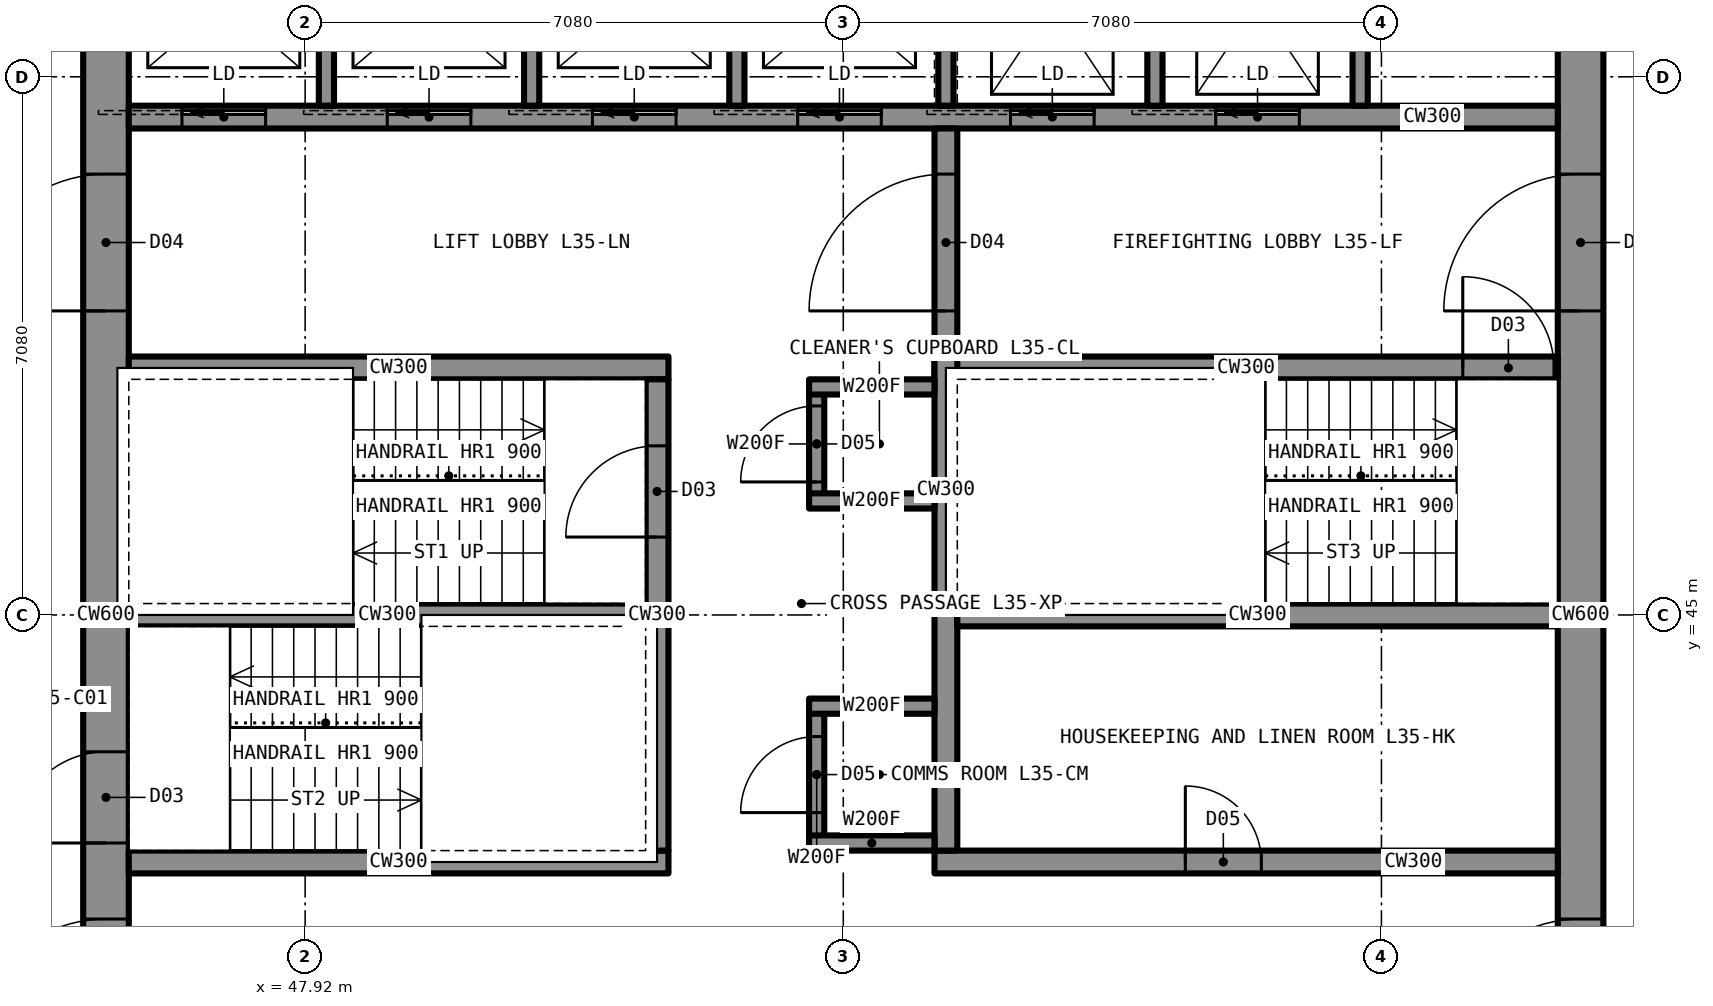
"""IFC4 building model, lengths in metres.
Left out: names, types, materials, properties, quantities, classifications, styles, units other than length and angle.
Written with IfcOpenShell. Run it as: python <this file> out.ifc"""

import sys

from ifc_helpers import new_model, si_unit, direction, frame, frame_2d, origin, place, context, subcontext, project, spatial, rectangle, extrude, element, fill, save


model = new_model("IFC4")
c1 = context("Model", 3, precision=1e-05, world=origin(), true_north=direction((0.0, 1.0)))
c2 = subcontext(c1, "Body", "Model", "MODEL_VIEW")
j1 = project(units=[si_unit("LENGTHUNIT", "METRE"), si_unit("PLANEANGLEUNIT", "RADIAN")], contexts=[c1])
p1 = place(None, origin())
s1 = spatial("IfcSite", under=j1, at=p1, CompositionType="ELEMENT")
p2 = place(p1, origin())
s2 = spatial("IfcBuilding", under=s1, at=p2, CompositionType="ELEMENT")
p3 = place(p2, frame((0.0, 0.0, 124.9)))
s3 = spatial("IfcBuildingStorey", under=s2, at=p3, CompositionType="ELEMENT", Elevation=124.9)
p4 = place(p3, frame((64.7, 35.6, 0.0), z_axis=(0.0, 0.0, 1.0), x_axis=(0.0, 1.0, 0.0)))
e1 = element("IfcWall", 1, at=p4, inside=s3, PredefinedType="SHEAR", context=c2, shape_type="SweptSolid", body=[
    extrude(rectangle(XDim=18.8, YDim=0.6, at=frame_2d((9.4, 0.0))), origin(), (0.0, 0.0, 1.0), 3.5),
])
p5 = place(p4, frame((13.4, 0.0, 0.0)))
e2 = element("IfcOpeningElement", 2, at=p5, cuts=e1, PredefinedType="OPENING", context=c2, shape_type="SweptSolid", body=[
    extrude(rectangle(XDim=1.8, YDim=2.2, at=frame_2d((0.9, 1.1))), frame((0.0, 0.31, 0.0), z_axis=(0.0, -1.0, 0.0), x_axis=(1.0, 0.0, 0.0)), (0.0, 0.0, 1.0), 0.62),
])
p6 = place(p4, frame((3.6, 0.0, 0.0)))
e3 = element("IfcOpeningElement", 3, at=p6, cuts=e1, PredefinedType="OPENING", context=c2, shape_type="SweptSolid", body=[
    extrude(rectangle(XDim=1.8, YDim=2.2, at=frame_2d((0.9, 1.1))), frame((0.0, 0.31, 0.0), z_axis=(0.0, -1.0, 0.0), x_axis=(1.0, 0.0, 0.0)), (0.0, 0.0, 1.0), 0.62),
])
p7 = place(p3, frame((45.3, 35.6, 0.0), z_axis=(0.0, 0.0, 1.0), x_axis=(0.0, 1.0, 0.0)))
e4 = element("IfcWall", 4, at=p7, inside=s3, PredefinedType="SHEAR", context=c2, shape_type="SweptSolid", body=[
    extrude(rectangle(XDim=18.8, YDim=0.6, at=frame_2d((9.4, 0.0))), origin(), (0.0, 0.0, 1.0), 3.5),
])
p8 = place(p7, frame((13.4, 0.0, 0.0)))
e5 = element("IfcOpeningElement", 5, at=p8, cuts=e4, PredefinedType="OPENING", context=c2, shape_type="SweptSolid", body=[
    extrude(rectangle(XDim=1.8, YDim=2.2, at=frame_2d((0.9, 1.1))), frame((0.0, 0.31, 0.0), z_axis=(0.0, -1.0, 0.0), x_axis=(1.0, 0.0, 0.0)), (0.0, 0.0, 1.0), 0.62),
])
p9 = place(p7, frame((3.6, 0.0, 0.0)))
e6 = element("IfcOpeningElement", 6, at=p9, cuts=e4, PredefinedType="OPENING", context=c2, shape_type="SweptSolid", body=[
    extrude(rectangle(XDim=1.8, YDim=2.2, at=frame_2d((0.9, 1.1))), frame((0.0, 0.31, 0.0), z_axis=(0.0, -1.0, 0.0), x_axis=(1.0, 0.0, 0.0)), (0.0, 0.0, 1.0), 0.62),
])
p10 = place(p7, frame((6.4, 0.0, 0.0)))
e7 = element("IfcOpeningElement", 7, at=p10, cuts=e4, PredefinedType="OPENING", context=c2, shape_type="SweptSolid", body=[
    extrude(rectangle(XDim=1.2, YDim=2.2, at=frame_2d((0.6, 1.1))), frame((0.0, 0.31, 0.0), z_axis=(0.0, -1.0, 0.0), x_axis=(1.0, 0.0, 0.0)), (0.0, 0.0, 1.0), 0.62),
])
p11 = place(p3, frame((45.6, 51.55, 0.0), z_axis=(0.0, 0.0, 1.0), x_axis=(1.0, 0.0, 0.0)))
e8 = element("IfcWall", 8, at=p11, inside=s3, PredefinedType="SHEAR", context=c2, shape_type="SweptSolid", body=[
    extrude(rectangle(XDim=18.8, YDim=0.3, at=frame_2d((9.4, 0.0))), origin(), (0.0, 0.0, 1.0), 3.5),
])
p12 = place(p11, frame((0.7, 0.0, 0.0)))
e9 = element("IfcOpeningElement", 9, at=p12, cuts=e8, PredefinedType="OPENING", context=c2, shape_type="SweptSolid", body=[
    extrude(rectangle(XDim=1.1, YDim=2.2, at=frame_2d((0.55, 1.1))), frame((0.0, 0.16, 0.0), z_axis=(0.0, -1.0, 0.0), x_axis=(1.0, 0.0, 0.0)), (0.0, 0.0, 1.0), 0.32),
])
p13 = place(p11, frame((3.4, 0.0, 0.0)))
e10 = element("IfcOpeningElement", 10, at=p13, cuts=e8, PredefinedType="OPENING", context=c2, shape_type="SweptSolid", body=[
    extrude(rectangle(XDim=1.1, YDim=2.2, at=frame_2d((0.55, 1.1))), frame((0.0, 0.16, 0.0), z_axis=(0.0, -1.0, 0.0), x_axis=(1.0, 0.0, 0.0)), (0.0, 0.0, 1.0), 0.32),
])
p14 = place(p11, frame((6.1, 0.0, 0.0)))
e11 = element("IfcOpeningElement", 11, at=p14, cuts=e8, PredefinedType="OPENING", context=c2, shape_type="SweptSolid", body=[
    extrude(rectangle(XDim=1.1, YDim=2.2, at=frame_2d((0.55, 1.1))), frame((0.0, 0.16, 0.0), z_axis=(0.0, -1.0, 0.0), x_axis=(1.0, 0.0, 0.0)), (0.0, 0.0, 1.0), 0.32),
])
p15 = place(p11, frame((8.8, 0.0, 0.0)))
e12 = element("IfcOpeningElement", 12, at=p15, cuts=e8, PredefinedType="OPENING", context=c2, shape_type="SweptSolid", body=[
    extrude(rectangle(XDim=1.1, YDim=2.2, at=frame_2d((0.55, 1.1))), frame((0.0, 0.16, 0.0), z_axis=(0.0, -1.0, 0.0), x_axis=(1.0, 0.0, 0.0)), (0.0, 0.0, 1.0), 0.32),
])
p16 = place(p11, frame((11.6, 0.0, 0.0)))
e13 = element("IfcOpeningElement", 13, at=p16, cuts=e8, PredefinedType="OPENING", context=c2, shape_type="SweptSolid", body=[
    extrude(rectangle(XDim=1.1, YDim=2.2, at=frame_2d((0.55, 1.1))), frame((0.0, 0.16, 0.0), z_axis=(0.0, -1.0, 0.0), x_axis=(1.0, 0.0, 0.0)), (0.0, 0.0, 1.0), 0.32),
])
p17 = place(p11, frame((14.3, 0.0, 0.0)))
e14 = element("IfcOpeningElement", 14, at=p17, cuts=e8, PredefinedType="OPENING", context=c2, shape_type="SweptSolid", body=[
    extrude(rectangle(XDim=1.1, YDim=2.2, at=frame_2d((0.55, 1.1))), frame((0.0, 0.16, 0.0), z_axis=(0.0, -1.0, 0.0), x_axis=(1.0, 0.0, 0.0)), (0.0, 0.0, 1.0), 0.32),
])
p18 = place(p3, frame((45.6, 48.25, 0.0), z_axis=(0.0, 0.0, 1.0), x_axis=(1.0, 0.0, 0.0)))
e15 = element("IfcWall", 15, at=p18, inside=s3, PredefinedType="SHEAR", context=c2, shape_type="SweptSolid", body=[
    extrude(rectangle(XDim=7.1, YDim=0.3, at=frame_2d((3.55, 0.0))), origin(), (0.0, 0.0, 1.0), 3.5),
])
p19 = place(p3, frame((56.2, 48.25, 0.0), z_axis=(0.0, 0.0, 1.0), x_axis=(1.0, 0.0, 0.0)))
e16 = element("IfcWall", 16, at=p19, inside=s3, PredefinedType="SHEAR", context=c2, shape_type="SweptSolid", body=[
    extrude(rectangle(XDim=8.2, YDim=0.3, at=frame_2d((4.1, 0.0))), origin(), (0.0, 0.0, 1.0), 3.5),
])
p20 = place(p19, frame((6.95, 0.0, 0.0)))
e17 = element("IfcOpeningElement", 17, at=p20, cuts=e16, PredefinedType="OPENING", context=c2, shape_type="SweptSolid", body=[
    extrude(rectangle(XDim=1.2, YDim=2.2, at=frame_2d((0.6, 1.1))), frame((0.0, 0.16, 0.0), z_axis=(0.0, -1.0, 0.0), x_axis=(1.0, 0.0, 0.0)), (0.0, 0.0, 1.0), 0.32),
])
p21 = place(p3, frame((45.6, 41.75, 0.0), z_axis=(0.0, 0.0, 1.0), x_axis=(1.0, 0.0, 0.0)))
e18 = element("IfcWall", 18, at=p21, inside=s3, PredefinedType="SHEAR", context=c2, shape_type="SweptSolid", body=[
    extrude(rectangle(XDim=7.1, YDim=0.3, at=frame_2d((3.55, 0.0))), origin(), (0.0, 0.0, 1.0), 3.5),
])
p22 = place(p3, frame((56.2, 41.75, 0.0), z_axis=(0.0, 0.0, 1.0), x_axis=(1.0, 0.0, 0.0)))
e19 = element("IfcWall", 19, at=p22, inside=s3, PredefinedType="SHEAR", context=c2, shape_type="SweptSolid", body=[
    extrude(rectangle(XDim=8.2, YDim=0.3, at=frame_2d((4.1, 0.0))), origin(), (0.0, 0.0, 1.0), 3.5),
])
p23 = place(p22, frame((3.3, 0.0, 0.0)))
e20 = element("IfcOpeningElement", 20, at=p23, cuts=e19, PredefinedType="OPENING", context=c2, shape_type="SweptSolid", body=[
    extrude(rectangle(XDim=1.0, YDim=2.1, at=frame_2d((0.5, 1.05))), frame((0.0, 0.16, 0.0), z_axis=(0.0, -1.0, 0.0), x_axis=(1.0, 0.0, 0.0)), (0.0, 0.0, 1.0), 0.32),
])
p24 = place(p3, frame((52.55, 41.9, 0.0), z_axis=(0.0, 0.0, 1.0), x_axis=(0.0, 1.0, 0.0)))
e21 = element("IfcWall", 21, at=p24, inside=s3, PredefinedType="SHEAR", context=c2, shape_type="SweptSolid", body=[
    extrude(rectangle(XDim=6.2, YDim=0.3, at=frame_2d((3.1, 0.0))), origin(), (0.0, 0.0, 1.0), 3.5),
])
p25 = place(p24, frame((4.125, 0.0, 0.0)))
e22 = element("IfcOpeningElement", 22, at=p25, cuts=e21, PredefinedType="OPENING", context=c2, shape_type="SweptSolid", body=[
    extrude(rectangle(XDim=1.2, YDim=2.2, at=frame_2d((0.6, 1.1))), frame((0.0, 0.16, 0.0), z_axis=(0.0, -1.0, 0.0), x_axis=(1.0, 0.0, 0.0)), (0.0, 0.0, 1.0), 0.32),
])
p26 = place(p3, frame((56.35, 41.9, 0.0), z_axis=(0.0, 0.0, 1.0), x_axis=(0.0, 1.0, 0.0)))
e23 = element("IfcWall", 23, at=p26, inside=s3, PredefinedType="SHEAR", context=c2, shape_type="SweptSolid", body=[
    extrude(rectangle(XDim=9.5, YDim=0.3, at=frame_2d((4.75, 0.0))), origin(), (0.0, 0.0, 1.0), 3.5),
])
p27 = place(p26, frame((7.1, 0.0, 0.0)))
e24 = element("IfcOpeningElement", 24, at=p27, cuts=e23, PredefinedType="OPENING", context=c2, shape_type="SweptSolid", body=[
    extrude(rectangle(XDim=1.8, YDim=2.2, at=frame_2d((0.9, 1.1))), frame((0.0, 0.16, 0.0), z_axis=(0.0, -1.0, 0.0), x_axis=(1.0, 0.0, 0.0)), (0.0, 0.0, 1.0), 0.32),
])
p28 = place(p3, frame((45.6, 45.0, 0.0), z_axis=(0.0, 0.0, 1.0), x_axis=(1.0, 0.0, 0.0)))
e25 = element("IfcWall", 25, at=p28, inside=s3, PredefinedType="SHEAR", context=c2, shape_type="SweptSolid", body=[
    extrude(rectangle(XDim=6.8, YDim=0.3, at=frame_2d((3.4, 0.0))), origin(), (0.0, 0.0, 1.0), 3.5),
])
p29 = place(p3, frame((56.5, 45.0, 0.0), z_axis=(0.0, 0.0, 1.0), x_axis=(1.0, 0.0, 0.0)))
e26 = element("IfcWall", 26, at=p29, inside=s3, PredefinedType="SHEAR", context=c2, shape_type="SweptSolid", body=[
    extrude(rectangle(XDim=7.9, YDim=0.3, at=frame_2d((3.95, 0.0))), origin(), (0.0, 0.0, 1.0), 3.5),
])
p30 = place(p3, frame((54.35, 42.0, 0.0), z_axis=(0.0, 0.0, 1.0), x_axis=(0.0, 1.0, 0.0)))
e27 = element("IfcWall", 27, at=p30, inside=s3, PredefinedType="PARTITIONING", context=c2, shape_type="SweptSolid", body=[
    extrude(rectangle(XDim=2.5, YDim=0.2, at=frame_2d((1.25, 0.0))), origin(), (0.0, 0.0, 1.0), 3.33),
])
p31 = place(p30, frame((0.75, 0.0, 0.0)))
e28 = element("IfcOpeningElement", 28, at=p31, cuts=e27, PredefinedType="OPENING", context=c2, shape_type="SweptSolid", body=[
    extrude(rectangle(XDim=1.0, YDim=2.1, at=frame_2d((0.5, 1.05))), frame((0.0, 0.11, 0.0), z_axis=(0.0, -1.0, 0.0), x_axis=(1.0, 0.0, 0.0)), (0.0, 0.0, 1.0), 0.22),
])
for number, where, z_axis, x_axis in (
    (29, (54.25, 42.0, 0.0), (0.0, 0.0, 1.0), (1.0, 0.0, 0.0)),
    (30, (54.25, 44.5, 0.0), (0.0, 0.0, 1.0), (1.0, 0.0, 0.0)),
):
    element("IfcWall", number, at=place(p3, frame(where, z_axis=z_axis, x_axis=x_axis)), inside=s3, PredefinedType="PARTITIONING", context=c2, shape_type="SweptSolid", body=[
        extrude(rectangle(XDim=1.95, YDim=0.2, at=frame_2d((0.975, 0.0))), origin(), (0.0, 0.0, 1.0), 3.33),
    ])
p32 = place(p3, frame((54.35, 44.9, 0.0), z_axis=(0.0, 0.0, 1.0), x_axis=(0.0, 1.0, 0.0)))
e31 = element("IfcWall", 31, at=p32, inside=s3, PredefinedType="PARTITIONING", context=c2, shape_type="SweptSolid", body=[
    extrude(rectangle(XDim=1.7, YDim=0.2, at=frame_2d((0.85, 0.0))), origin(), (0.0, 0.0, 1.0), 3.33),
])
p33 = place(p32, frame((0.35, 0.0, 0.0)))
e32 = element("IfcOpeningElement", 32, at=p33, cuts=e31, PredefinedType="OPENING", context=c2, shape_type="SweptSolid", body=[
    extrude(rectangle(XDim=1.0, YDim=2.1, at=frame_2d((0.5, 1.05))), frame((0.0, 0.11, 0.0), z_axis=(0.0, -1.0, 0.0), x_axis=(1.0, 0.0, 0.0)), (0.0, 0.0, 1.0), 0.22),
])
for number, where, z_axis, x_axis in (
    (33, (54.25, 44.9, 0.0), (0.0, 0.0, 1.0), (1.0, 0.0, 0.0)),
    (34, (54.25, 46.6, 0.0), (0.0, 0.0, 1.0), (1.0, 0.0, 0.0)),
):
    element("IfcWall", number, at=place(p3, frame(where, z_axis=z_axis, x_axis=x_axis)), inside=s3, PredefinedType="PARTITIONING", context=c2, shape_type="SweptSolid", body=[
        extrude(rectangle(XDim=1.95, YDim=0.2, at=frame_2d((0.975, 0.0))), origin(), (0.0, 0.0, 1.0), 3.33),
    ])
for number, where, z_axis, x_axis in (
    (35, (48.2, 51.7, 0.0), (0.0, 0.0, 1.0), (0.0, 1.0, 0.0)),
    (36, (50.9, 51.7, 0.0), (0.0, 0.0, 1.0), (0.0, 1.0, 0.0)),
    (37, (53.6, 51.7, 0.0), (0.0, 0.0, 1.0), (0.0, 1.0, 0.0)),
    (38, (59.1, 51.7, 0.0), (0.0, 0.0, 1.0), (0.0, 1.0, 0.0)),
    (39, (61.8, 51.7, 0.0), (0.0, 0.0, 1.0), (0.0, 1.0, 0.0)),
    (40, (56.35, 51.7, 0.0), (0.0, 0.0, 1.0), (0.0, 1.0, 0.0)),
):
    element("IfcWall", number, at=place(p3, frame(where, z_axis=z_axis, x_axis=x_axis)), inside=s3, PredefinedType="PARTITIONING", context=c2, shape_type="SweptSolid", body=[
        extrude(rectangle(XDim=2.7, YDim=0.2, at=frame_2d((1.35, 0.0))), origin(), (0.0, 0.0, 1.0), 3.33),
    ])
p34 = place(p31, origin())
e41 = element("IfcDoor", 41, at=p34, inside=s3, OperationType="SINGLE_SWING_LEFT", PredefinedType="DOOR", context=c2, shape_type="SweptSolid", body=[
    extrude(rectangle(XDim=1.0, YDim=2.1, at=frame_2d((0.5, 1.05))), frame((0.0, 0.025, 0.0), z_axis=(0.0, -1.0, 0.0), x_axis=(1.0, 0.0, 0.0)), (0.0, 0.0, 1.0), 0.05),
])
fill(e28, e41)
p35 = place(p33, origin())
e42 = element("IfcDoor", 42, at=p35, inside=s3, OperationType="SINGLE_SWING_LEFT", PredefinedType="DOOR", context=c2, shape_type="SweptSolid", body=[
    extrude(rectangle(XDim=1.0, YDim=2.1, at=frame_2d((0.5, 1.05))), frame((0.0, 0.025, 0.0), z_axis=(0.0, -1.0, 0.0), x_axis=(1.0, 0.0, 0.0)), (0.0, 0.0, 1.0), 0.05),
])
fill(e32, e42)
p36 = place(p8, origin())
e43 = element("IfcDoor", 43, at=p36, inside=s3, OperationType="DOUBLE_DOOR_SINGLE_SWING", PredefinedType="DOOR", context=c2, shape_type="SweptSolid", body=[
    extrude(rectangle(XDim=1.8, YDim=2.2, at=frame_2d((0.9, 1.1))), frame((0.0, 0.025, 0.0), z_axis=(0.0, -1.0, 0.0), x_axis=(1.0, 0.0, 0.0)), (0.0, 0.0, 1.0), 0.05),
])
fill(e5, e43)
p37 = place(p9, origin())
e44 = element("IfcDoor", 44, at=p37, inside=s3, OperationType="DOUBLE_DOOR_SINGLE_SWING", PredefinedType="DOOR", context=c2, shape_type="SweptSolid", body=[
    extrude(rectangle(XDim=1.8, YDim=2.2, at=frame_2d((0.9, 1.1))), frame((0.0, 0.025, 0.0), z_axis=(0.0, -1.0, 0.0), x_axis=(1.0, 0.0, 0.0)), (0.0, 0.0, 1.0), 0.05),
])
fill(e6, e44)
p38 = place(p5, origin())
e45 = element("IfcDoor", 45, at=p38, inside=s3, OperationType="DOUBLE_DOOR_SINGLE_SWING", PredefinedType="DOOR", context=c2, shape_type="SweptSolid", body=[
    extrude(rectangle(XDim=1.8, YDim=2.2, at=frame_2d((0.9, 1.1))), frame((0.0, 0.025, 0.0), z_axis=(0.0, -1.0, 0.0), x_axis=(1.0, 0.0, 0.0)), (0.0, 0.0, 1.0), 0.05),
])
fill(e2, e45)
p39 = place(p6, origin())
e46 = element("IfcDoor", 46, at=p39, inside=s3, OperationType="DOUBLE_DOOR_SINGLE_SWING", PredefinedType="DOOR", context=c2, shape_type="SweptSolid", body=[
    extrude(rectangle(XDim=1.8, YDim=2.2, at=frame_2d((0.9, 1.1))), frame((0.0, 0.025, 0.0), z_axis=(0.0, -1.0, 0.0), x_axis=(1.0, 0.0, 0.0)), (0.0, 0.0, 1.0), 0.05),
])
fill(e3, e46)
p40 = place(p27, origin())
e47 = element("IfcDoor", 47, at=p40, inside=s3, OperationType="DOUBLE_DOOR_SINGLE_SWING", PredefinedType="DOOR", context=c2, shape_type="SweptSolid", body=[
    extrude(rectangle(XDim=1.8, YDim=2.2, at=frame_2d((0.9, 1.1))), frame((0.0, 0.025, 0.0), z_axis=(0.0, -1.0, 0.0), x_axis=(1.0, 0.0, 0.0)), (0.0, 0.0, 1.0), 0.05),
])
fill(e24, e47)
p41 = place(p25, origin())
e48 = element("IfcDoor", 48, at=p41, inside=s3, OperationType="SINGLE_SWING_LEFT", PredefinedType="DOOR", context=c2, shape_type="SweptSolid", body=[
    extrude(rectangle(XDim=1.2, YDim=2.2, at=frame_2d((0.6, 1.1))), frame((0.0, 0.025, 0.0), z_axis=(0.0, -1.0, 0.0), x_axis=(1.0, 0.0, 0.0)), (0.0, 0.0, 1.0), 0.05),
])
fill(e22, e48)
p42 = place(p10, origin())
e49 = element("IfcDoor", 49, at=p42, inside=s3, OperationType="SINGLE_SWING_LEFT", PredefinedType="DOOR", context=c2, shape_type="SweptSolid", body=[
    extrude(rectangle(XDim=1.2, YDim=2.2, at=frame_2d((0.6, 1.1))), frame((0.0, 0.025, 0.0), z_axis=(0.0, -1.0, 0.0), x_axis=(1.0, 0.0, 0.0)), (0.0, 0.0, 1.0), 0.05),
])
fill(e7, e49)
p43 = place(p20, origin())
e50 = element("IfcDoor", 50, at=p43, inside=s3, OperationType="SINGLE_SWING_LEFT", PredefinedType="DOOR", context=c2, shape_type="SweptSolid", body=[
    extrude(rectangle(XDim=1.2, YDim=2.2, at=frame_2d((0.6, 1.1))), frame((0.0, 0.025, 0.0), z_axis=(0.0, -1.0, 0.0), x_axis=(1.0, 0.0, 0.0)), (0.0, 0.0, 1.0), 0.05),
])
fill(e17, e50)
p44 = place(p23, origin())
e51 = element("IfcDoor", 51, at=p44, inside=s3, OperationType="SINGLE_SWING_LEFT", PredefinedType="DOOR", context=c2, shape_type="SweptSolid", body=[
    extrude(rectangle(XDim=1.0, YDim=2.1, at=frame_2d((0.5, 1.05))), frame((0.0, 0.025, 0.0), z_axis=(0.0, -1.0, 0.0), x_axis=(1.0, 0.0, 0.0)), (0.0, 0.0, 1.0), 0.05),
])
fill(e20, e51)
p45 = place(p12, origin())
e52 = element("IfcDoor", 52, at=p45, inside=s3, OperationType="SLIDING_TO_LEFT", PredefinedType="DOOR", context=c2, shape_type="SweptSolid", body=[
    extrude(rectangle(XDim=1.1, YDim=2.2, at=frame_2d((0.55, 1.1))), frame((0.0, 0.025, 0.0), z_axis=(0.0, -1.0, 0.0), x_axis=(1.0, 0.0, 0.0)), (0.0, 0.0, 1.0), 0.05),
])
fill(e9, e52)
p46 = place(p13, origin())
e53 = element("IfcDoor", 53, at=p46, inside=s3, OperationType="SLIDING_TO_LEFT", PredefinedType="DOOR", context=c2, shape_type="SweptSolid", body=[
    extrude(rectangle(XDim=1.1, YDim=2.2, at=frame_2d((0.55, 1.1))), frame((0.0, 0.025, 0.0), z_axis=(0.0, -1.0, 0.0), x_axis=(1.0, 0.0, 0.0)), (0.0, 0.0, 1.0), 0.05),
])
fill(e10, e53)
p47 = place(p14, origin())
e54 = element("IfcDoor", 54, at=p47, inside=s3, OperationType="SLIDING_TO_LEFT", PredefinedType="DOOR", context=c2, shape_type="SweptSolid", body=[
    extrude(rectangle(XDim=1.1, YDim=2.2, at=frame_2d((0.55, 1.1))), frame((0.0, 0.025, 0.0), z_axis=(0.0, -1.0, 0.0), x_axis=(1.0, 0.0, 0.0)), (0.0, 0.0, 1.0), 0.05),
])
fill(e11, e54)
p48 = place(p15, origin())
e55 = element("IfcDoor", 55, at=p48, inside=s3, OperationType="SLIDING_TO_LEFT", PredefinedType="DOOR", context=c2, shape_type="SweptSolid", body=[
    extrude(rectangle(XDim=1.1, YDim=2.2, at=frame_2d((0.55, 1.1))), frame((0.0, 0.025, 0.0), z_axis=(0.0, -1.0, 0.0), x_axis=(1.0, 0.0, 0.0)), (0.0, 0.0, 1.0), 0.05),
])
fill(e12, e55)
p49 = place(p16, origin())
e56 = element("IfcDoor", 56, at=p49, inside=s3, OperationType="SLIDING_TO_LEFT", PredefinedType="DOOR", context=c2, shape_type="SweptSolid", body=[
    extrude(rectangle(XDim=1.1, YDim=2.2, at=frame_2d((0.55, 1.1))), frame((0.0, 0.025, 0.0), z_axis=(0.0, -1.0, 0.0), x_axis=(1.0, 0.0, 0.0)), (0.0, 0.0, 1.0), 0.05),
])
fill(e13, e56)
p50 = place(p17, origin())
e57 = element("IfcDoor", 57, at=p50, inside=s3, OperationType="SLIDING_TO_LEFT", PredefinedType="DOOR", context=c2, shape_type="SweptSolid", body=[
    extrude(rectangle(XDim=1.1, YDim=2.2, at=frame_2d((0.55, 1.1))), frame((0.0, 0.025, 0.0), z_axis=(0.0, -1.0, 0.0), x_axis=(1.0, 0.0, 0.0)), (0.0, 0.0, 1.0), 0.05),
])
fill(e14, e57)
save(model, sys.argv[1])
